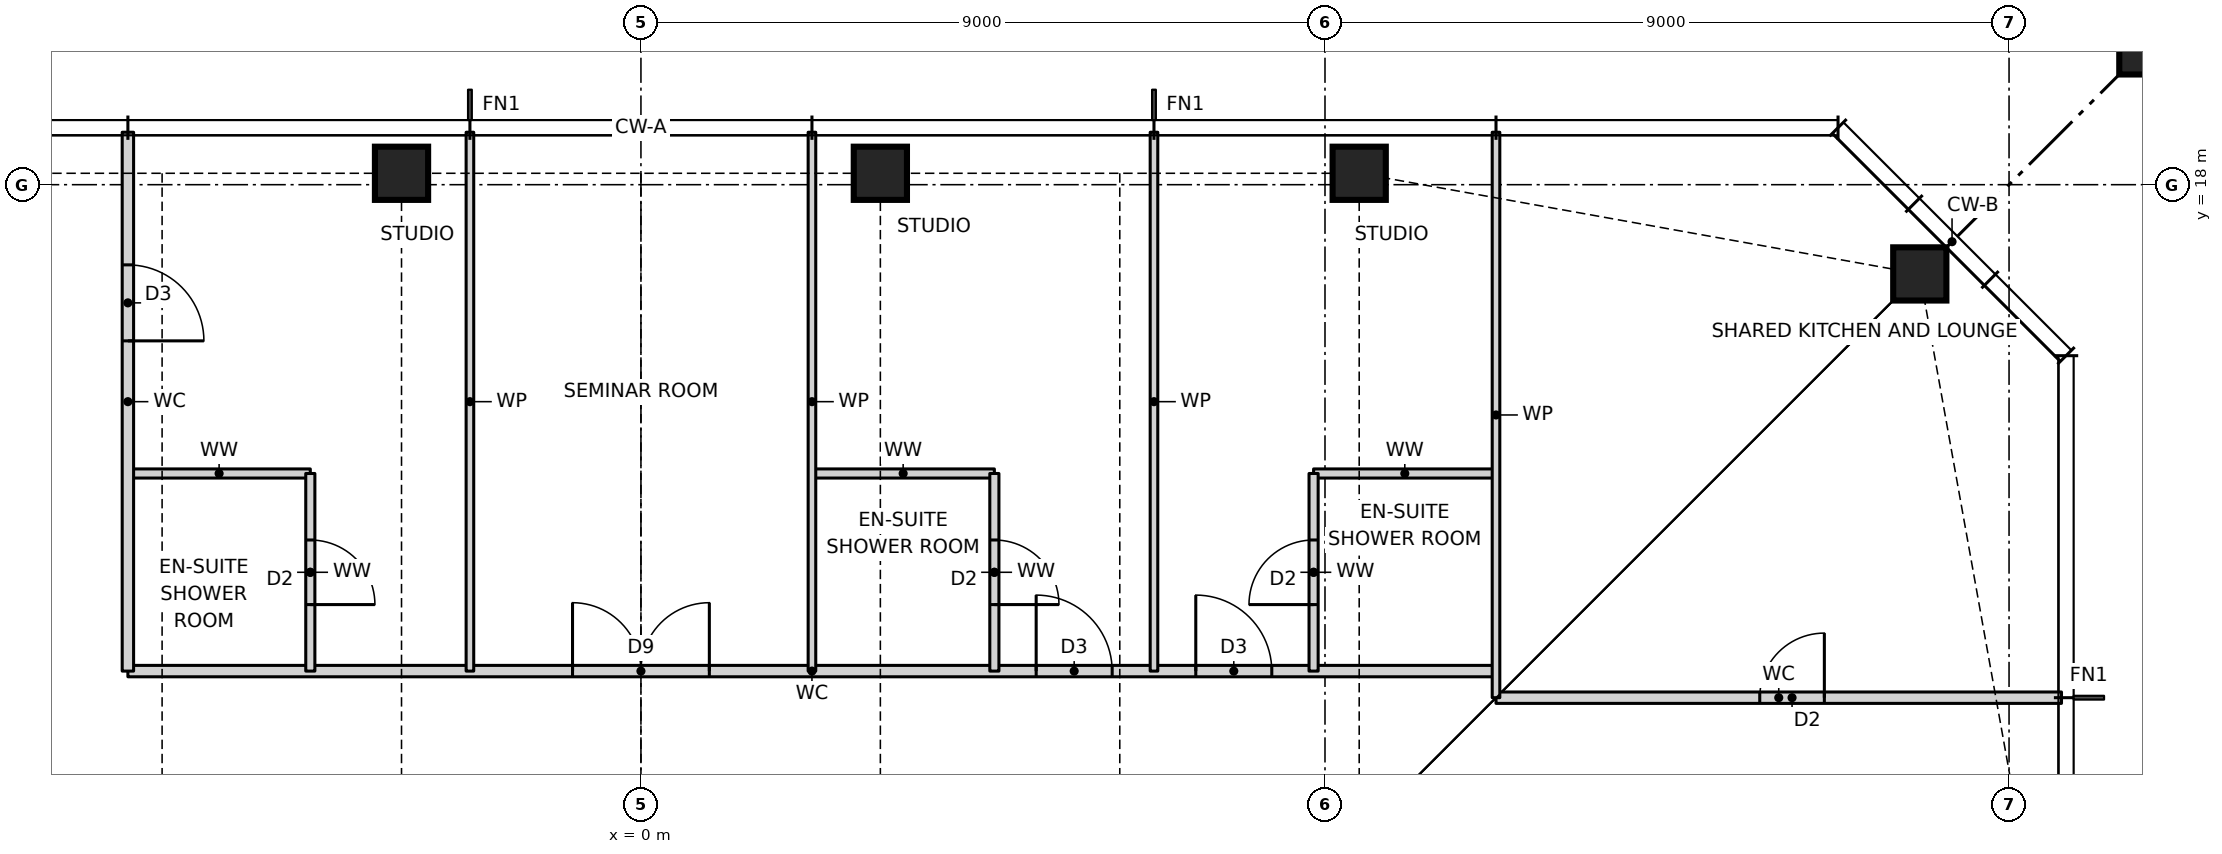
"""IFC4 building model, lengths in metres.
Left out: names, types, materials, properties, quantities, classifications, styles, units other than length and angle.
Written with IfcOpenShell. Run it as: python <this file> out.ifc"""

import sys

from ifc_helpers import new_model, si_unit, direction, frame, frame_2d, origin, origin_2d, place, context, subcontext, project, spatial, rectangle, hollow_rectangle, i_section, extrude, element, fill, save


model = new_model("IFC4")
c1 = context("Model", 3, precision=1e-05, world=origin(), true_north=direction((0.0, 1.0)))
c2 = subcontext(c1, "Body", "Model", "MODEL_VIEW")
j1 = project(units=[si_unit("LENGTHUNIT", "METRE"), si_unit("PLANEANGLEUNIT", "RADIAN")], contexts=[c1])
p1 = place(None, origin())
s1 = spatial("IfcSite", under=j1, at=p1, CompositionType="ELEMENT")
p2 = place(p1, origin())
s2 = spatial("IfcBuilding", under=s1, at=p2, CompositionType="ELEMENT")
p3 = place(p2, frame((0.0, 0.0, 160.0)))
s3 = spatial("IfcBuildingStorey", under=s2, at=p3, CompositionType="ELEMENT", Elevation=160.0)
for number, where, z_axis, x_axis in (
    (1, (16.826, 16.826, 0.0), (0.0, 0.0, 1.0), (1.0, 0.0, 0.0)),
    (2, (9.45, 18.15, 0.0), (0.0, 0.0, 1.0), (1.0, 0.0, 0.0)),
    (3, (3.15, 18.15, 0.0), (0.0, 0.0, 1.0), (1.0, 0.0, 0.0)),
    (4, (-3.15, 18.15, 0.0), (0.0, 0.0, 1.0), (1.0, 0.0, 0.0)),
):
    element("IfcColumn", number, at=place(p3, frame(where, z_axis=z_axis, x_axis=x_axis)), inside=s3, PredefinedType="COLUMN", context=c2, shape_type="SweptSolid", body=[
        extrude(hollow_rectangle(XDim=0.7, YDim=0.7, WallThickness=0.06, at=origin_2d()), origin(), (0.0, 0.0, 1.0), 3.5),
    ])
p4 = place(p3, frame((21.65, 21.65, 0.0), z_axis=(0.0, 0.0, 1.0), x_axis=(1.0, 0.0, 0.0)))
e5 = element("IfcColumn", 5, at=p4, inside=s3, PredefinedType="COLUMN", context=c2, shape_type="SweptSolid", body=[
    extrude(rectangle(XDim=4.4, YDim=4.4, at=origin_2d()), origin(), (0.0, 0.0, 1.0), 3.5),
    extrude(i_section(OverallWidth=0.478, OverallDepth=0.599, WebThickness=0.1, FlangeThickness=0.14, at=origin_2d()), origin(), (0.0, 0.0, 1.0), 3.5),
])
p5 = place(p3, frame((11.25, 11.25, 0.0), z_axis=(0.0, 0.0, 1.0), x_axis=(1.0, 0.0, 0.0)))
e6 = element("IfcWall", 6, at=p5, inside=s3, PredefinedType="PARTITIONING", context=c2, shape_type="SweptSolid", body=[
    extrude(rectangle(XDim=7.44, YDim=0.15, at=frame_2d((3.72, 0.0))), origin(), (0.0, 0.0, 1.0), 3.27),
])
p6 = place(p5, frame((3.47, 0.0, 0.0)))
e7 = element("IfcOpeningElement", 7, at=p6, cuts=e6, PredefinedType="OPENING", context=c2, shape_type="SweptSolid", body=[
    extrude(rectangle(XDim=0.85, YDim=2.1, at=frame_2d((0.425, 1.05))), frame((0.0, 0.085, 0.0), z_axis=(0.0, -1.0, 0.0), x_axis=(1.0, 0.0, 0.0)), (0.0, 0.0, 1.0), 0.17),
])
p7 = place(p3, frame((-6.75, 11.6, 0.0), z_axis=(0.0, 0.0, 1.0), x_axis=(1.0, 0.0, 0.0)))
e8 = element("IfcWall", 8, at=p7, inside=s3, PredefinedType="PARTITIONING", context=c2, shape_type="SweptSolid", body=[
    extrude(rectangle(XDim=18.0, YDim=0.15, at=frame_2d((9.0, 0.0))), origin(), (0.0, 0.0, 1.0), 3.27),
])
p8 = place(p7, frame((14.05, 0.0, 0.0)))
e9 = element("IfcOpeningElement", 9, at=p8, cuts=e8, PredefinedType="OPENING", context=c2, shape_type="SweptSolid", body=[
    extrude(rectangle(XDim=1.0, YDim=2.1, at=frame_2d((0.5, 1.05))), frame((0.0, 0.085, 0.0), z_axis=(0.0, -1.0, 0.0), x_axis=(1.0, 0.0, 0.0)), (0.0, 0.0, 1.0), 0.17),
])
p9 = place(p7, frame((11.95, 0.0, 0.0)))
e10 = element("IfcOpeningElement", 10, at=p9, cuts=e8, PredefinedType="OPENING", context=c2, shape_type="SweptSolid", body=[
    extrude(rectangle(XDim=1.0, YDim=2.1, at=frame_2d((0.5, 1.05))), frame((0.0, 0.085, 0.0), z_axis=(0.0, -1.0, 0.0), x_axis=(1.0, 0.0, 0.0)), (0.0, 0.0, 1.0), 0.17),
])
p10 = place(p7, frame((5.85, 0.0, 0.0)))
e11 = element("IfcOpeningElement", 11, at=p10, cuts=e8, PredefinedType="OPENING", context=c2, shape_type="SweptSolid", body=[
    extrude(rectangle(XDim=1.8, YDim=2.1, at=frame_2d((0.9, 1.05))), frame((0.0, 0.085, 0.0), z_axis=(0.0, -1.0, 0.0), x_axis=(1.0, 0.0, 0.0)), (0.0, 0.0, 1.0), 0.17),
])
for number, where, z_axis, x_axis in (
    (12, (-6.75, 14.2, 0.0), (0.0, 0.0, 1.0), (1.0, 0.0, 0.0)),
    (13, (2.25, 14.2, 0.0), (0.0, 0.0, 1.0), (1.0, 0.0, 0.0)),
    (14, (8.85, 14.2, 0.0), (0.0, 0.0, 1.0), (1.0, 0.0, 0.0)),
):
    element("IfcWall", number, at=place(p3, frame(where, z_axis=z_axis, x_axis=x_axis)), inside=s3, PredefinedType="PARTITIONING", context=c2, shape_type="SweptSolid", body=[
        extrude(rectangle(XDim=2.4, YDim=0.12, at=frame_2d((1.2, 0.0))), origin(), (0.0, 0.0, 1.0), 3.27),
    ])
p11 = place(p3, frame((11.25, 11.25, 0.0), z_axis=(0.0, 0.0, 1.0), x_axis=(0.0, 1.0, 0.0)))
e15 = element("IfcWall", 15, at=p11, inside=s3, PredefinedType="PARTITIONING", context=c2, shape_type="SweptSolid", body=[
    extrude(rectangle(XDim=7.44, YDim=0.1, at=frame_2d((3.72, 0.0))), origin(), (0.0, 0.0, 1.0), 3.27),
])
p12 = place(p3, frame((8.85, 11.6, 0.0), z_axis=(0.0, 0.0, 1.0), x_axis=(0.0, 1.0, 0.0)))
e16 = element("IfcWall", 16, at=p12, inside=s3, PredefinedType="PARTITIONING", context=c2, shape_type="SweptSolid", body=[
    extrude(rectangle(XDim=2.6, YDim=0.12, at=frame_2d((1.3, 0.0))), origin(), (0.0, 0.0, 1.0), 3.27),
])
p13 = place(p12, frame((0.875, 0.0, 0.0)))
e17 = element("IfcOpeningElement", 17, at=p13, cuts=e16, PredefinedType="OPENING", context=c2, shape_type="SweptSolid", body=[
    extrude(rectangle(XDim=0.85, YDim=2.1, at=frame_2d((0.425, 1.05))), frame((0.0, 0.07, 0.0), z_axis=(0.0, -1.0, 0.0), x_axis=(1.0, 0.0, 0.0)), (0.0, 0.0, 1.0), 0.14),
])
p14 = place(p3, frame((6.75, 11.6, 0.0), z_axis=(0.0, 0.0, 1.0), x_axis=(0.0, 1.0, 0.0)))
e18 = element("IfcWall", 18, at=p14, inside=s3, PredefinedType="PARTITIONING", context=c2, shape_type="SweptSolid", body=[
    extrude(rectangle(XDim=7.09, YDim=0.1, at=frame_2d((3.545, 0.0))), origin(), (0.0, 0.0, 1.0), 3.27),
])
p15 = place(p3, frame((4.65, 11.6, 0.0), z_axis=(0.0, 0.0, 1.0), x_axis=(0.0, 1.0, 0.0)))
e19 = element("IfcWall", 19, at=p15, inside=s3, PredefinedType="PARTITIONING", context=c2, shape_type="SweptSolid", body=[
    extrude(rectangle(XDim=2.6, YDim=0.12, at=frame_2d((1.3, 0.0))), origin(), (0.0, 0.0, 1.0), 3.27),
])
p16 = place(p15, frame((0.875, 0.0, 0.0)))
e20 = element("IfcOpeningElement", 20, at=p16, cuts=e19, PredefinedType="OPENING", context=c2, shape_type="SweptSolid", body=[
    extrude(rectangle(XDim=0.85, YDim=2.1, at=frame_2d((0.425, 1.05))), frame((0.0, 0.07, 0.0), z_axis=(0.0, -1.0, 0.0), x_axis=(1.0, 0.0, 0.0)), (0.0, 0.0, 1.0), 0.14),
])
for number, where, z_axis, x_axis in (
    (21, (2.25, 11.6, 0.0), (0.0, 0.0, 1.0), (0.0, 1.0, 0.0)),
    (22, (-2.25, 11.6, 0.0), (0.0, 0.0, 1.0), (0.0, 1.0, 0.0)),
):
    element("IfcWall", number, at=place(p3, frame(where, z_axis=z_axis, x_axis=x_axis)), inside=s3, PredefinedType="PARTITIONING", context=c2, shape_type="SweptSolid", body=[
        extrude(rectangle(XDim=7.09, YDim=0.1, at=frame_2d((3.545, 0.0))), origin(), (0.0, 0.0, 1.0), 3.27),
    ])
p17 = place(p3, frame((-4.35, 11.6, 0.0), z_axis=(0.0, 0.0, 1.0), x_axis=(0.0, 1.0, 0.0)))
e23 = element("IfcWall", 23, at=p17, inside=s3, PredefinedType="PARTITIONING", context=c2, shape_type="SweptSolid", body=[
    extrude(rectangle(XDim=2.6, YDim=0.12, at=frame_2d((1.3, 0.0))), origin(), (0.0, 0.0, 1.0), 3.27),
])
p18 = place(p17, frame((0.875, 0.0, 0.0)))
e24 = element("IfcOpeningElement", 24, at=p18, cuts=e23, PredefinedType="OPENING", context=c2, shape_type="SweptSolid", body=[
    extrude(rectangle(XDim=0.85, YDim=2.1, at=frame_2d((0.425, 1.05))), frame((0.0, 0.07, 0.0), z_axis=(0.0, -1.0, 0.0), x_axis=(1.0, 0.0, 0.0)), (0.0, 0.0, 1.0), 0.14),
])
p19 = place(p3, frame((-6.75, 11.6, 0.0), z_axis=(0.0, 0.0, 1.0), x_axis=(0.0, 1.0, 0.0)))
e25 = element("IfcWall", 25, at=p19, inside=s3, PredefinedType="PARTITIONING", context=c2, shape_type="SweptSolid", body=[
    extrude(rectangle(XDim=7.09, YDim=0.15, at=frame_2d((3.545, 0.0))), origin(), (0.0, 0.0, 1.0), 3.27),
])
p20 = place(p19, frame((4.345, 0.0, 0.0)))
e26 = element("IfcOpeningElement", 26, at=p20, cuts=e25, PredefinedType="OPENING", context=c2, shape_type="SweptSolid", body=[
    extrude(rectangle(XDim=1.0, YDim=2.1, at=frame_2d((0.5, 1.05))), frame((0.0, 0.085, 0.0), z_axis=(0.0, -1.0, 0.0), x_axis=(1.0, 0.0, 0.0)), (0.0, 0.0, 1.0), 0.17),
])
p21 = place(p8, origin())
e27 = element("IfcDoor", 27, at=p21, inside=s3, OperationType="SINGLE_SWING_LEFT", PredefinedType="DOOR", context=c2, shape_type="SweptSolid", body=[
    extrude(rectangle(XDim=1.0, YDim=2.1, at=frame_2d((0.5, 1.05))), frame((0.0, 0.025, 0.0), z_axis=(0.0, -1.0, 0.0), x_axis=(1.0, 0.0, 0.0)), (0.0, 0.0, 1.0), 0.05),
])
fill(e9, e27)
p22 = place(p13, origin())
e28 = element("IfcDoor", 28, at=p22, inside=s3, OperationType="SINGLE_SWING_LEFT", PredefinedType="DOOR", context=c2, shape_type="SweptSolid", body=[
    extrude(rectangle(XDim=0.85, YDim=2.1, at=frame_2d((0.425, 1.05))), frame((0.0, 0.025, 0.0), z_axis=(0.0, -1.0, 0.0), x_axis=(1.0, 0.0, 0.0)), (0.0, 0.0, 1.0), 0.05),
])
fill(e17, e28)
p23 = place(p9, origin())
e29 = element("IfcDoor", 29, at=p23, inside=s3, OperationType="SINGLE_SWING_LEFT", PredefinedType="DOOR", context=c2, shape_type="SweptSolid", body=[
    extrude(rectangle(XDim=1.0, YDim=2.1, at=frame_2d((0.5, 1.05))), frame((0.0, 0.025, 0.0), z_axis=(0.0, -1.0, 0.0), x_axis=(1.0, 0.0, 0.0)), (0.0, 0.0, 1.0), 0.05),
])
fill(e10, e29)
p24 = place(p16, frame((0.85, 0.0, 0.0), z_axis=(0.0, 0.0, 1.0), x_axis=(-1.0, 0.0, 0.0)))
e30 = element("IfcDoor", 30, at=p24, inside=s3, OperationType="SINGLE_SWING_RIGHT", PredefinedType="DOOR", context=c2, shape_type="SweptSolid", body=[
    extrude(rectangle(XDim=0.85, YDim=2.1, at=frame_2d((0.425, 1.05))), frame((0.0, 0.025, 0.0), z_axis=(0.0, -1.0, 0.0), x_axis=(1.0, 0.0, 0.0)), (0.0, 0.0, 1.0), 0.05),
])
fill(e20, e30)
p25 = place(p10, origin())
e31 = element("IfcDoor", 31, at=p25, inside=s3, OperationType="DOUBLE_DOOR_SINGLE_SWING", PredefinedType="DOOR", context=c2, shape_type="SweptSolid", body=[
    extrude(rectangle(XDim=1.8, YDim=2.1, at=frame_2d((0.9, 1.05))), frame((0.0, 0.025, 0.0), z_axis=(0.0, -1.0, 0.0), x_axis=(1.0, 0.0, 0.0)), (0.0, 0.0, 1.0), 0.05),
])
fill(e11, e31)
p26 = place(p20, frame((1.0, 0.0, 0.0), z_axis=(0.0, 0.0, 1.0), x_axis=(-1.0, 0.0, 0.0)))
e32 = element("IfcDoor", 32, at=p26, inside=s3, OperationType="SINGLE_SWING_RIGHT", PredefinedType="DOOR", context=c2, shape_type="SweptSolid", body=[
    extrude(rectangle(XDim=1.0, YDim=2.1, at=frame_2d((0.5, 1.05))), frame((0.0, 0.025, 0.0), z_axis=(0.0, -1.0, 0.0), x_axis=(1.0, 0.0, 0.0)), (0.0, 0.0, 1.0), 0.05),
])
fill(e26, e32)
p27 = place(p18, frame((0.85, 0.0, 0.0), z_axis=(0.0, 0.0, 1.0), x_axis=(-1.0, 0.0, 0.0)))
e33 = element("IfcDoor", 33, at=p27, inside=s3, OperationType="SINGLE_SWING_RIGHT", PredefinedType="DOOR", context=c2, shape_type="SweptSolid", body=[
    extrude(rectangle(XDim=0.85, YDim=2.1, at=frame_2d((0.425, 1.05))), frame((0.0, 0.025, 0.0), z_axis=(0.0, -1.0, 0.0), x_axis=(1.0, 0.0, 0.0)), (0.0, 0.0, 1.0), 0.05),
])
fill(e24, e33)
p28 = place(p6, origin())
e34 = element("IfcDoor", 34, at=p28, inside=s3, OperationType="SINGLE_SWING_RIGHT", PredefinedType="DOOR", context=c2, shape_type="SweptSolid", body=[
    extrude(rectangle(XDim=0.85, YDim=2.1, at=frame_2d((0.425, 1.05))), frame((0.0, 0.025, 0.0), z_axis=(0.0, -1.0, 0.0), x_axis=(1.0, 0.0, 0.0)), (0.0, 0.0, 1.0), 0.05),
])
fill(e7, e34)
save(model, sys.argv[1])
